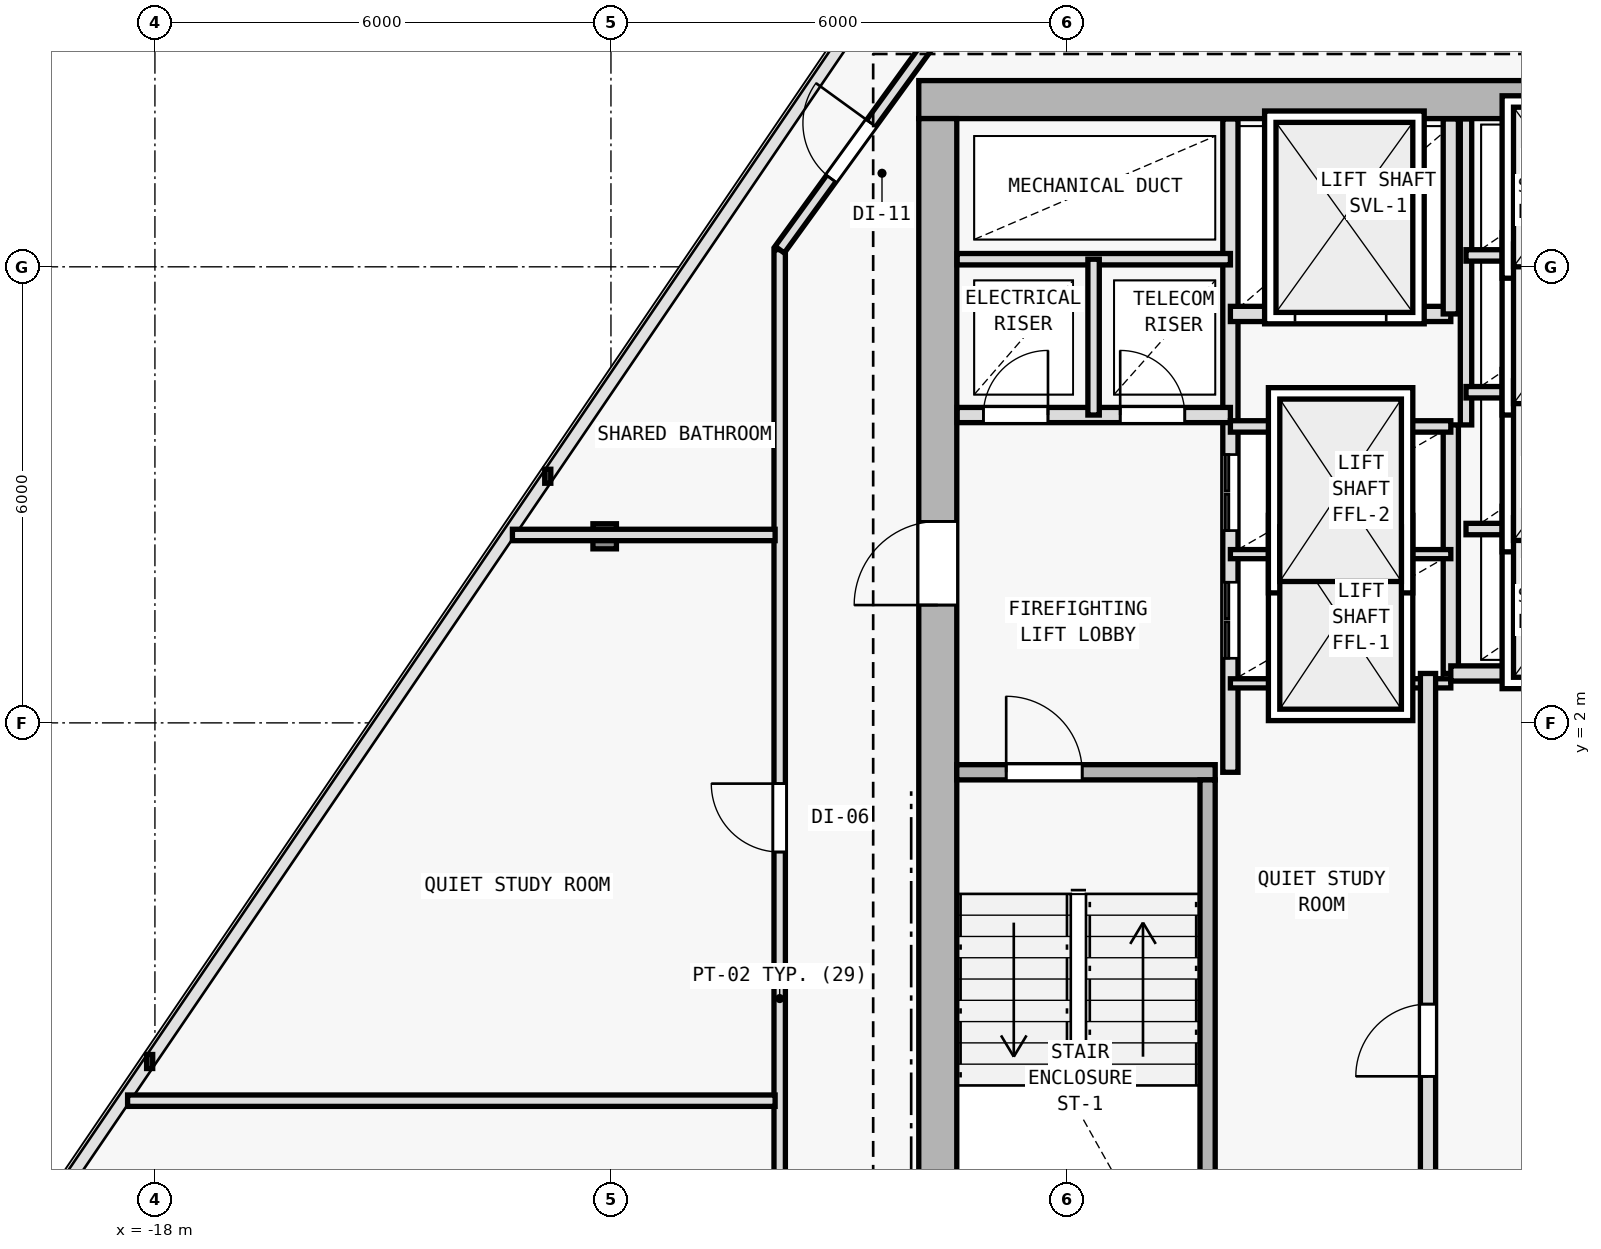
"""IFC4 building model, lengths in metres.
Left out: names, types, materials, properties, quantities, classifications, styles, units other than length and angle.
Written with IfcOpenShell. Run it as: python <this file> out.ifc"""

import sys

from ifc_helpers import new_model, si_unit, direction, frame, frame_2d, origin, origin_2d, place, context, subcontext, project, spatial, rectangle, i_section, extrude, element, fill, save


model = new_model("IFC4")
c1 = context("Model", 3, precision=1e-05, world=origin(), true_north=direction((0.0, 1.0)))
c2 = subcontext(c1, "Body", "Model", "MODEL_VIEW")
j1 = project(units=[si_unit("LENGTHUNIT", "METRE"), si_unit("PLANEANGLEUNIT", "RADIAN")], contexts=[c1])
p1 = place(None, origin())
s1 = spatial("IfcSite", under=j1, at=p1, CompositionType="ELEMENT")
p2 = place(p1, origin())
s2 = spatial("IfcBuilding", under=s1, at=p2, CompositionType="ELEMENT")
p3 = place(p2, frame((0.0, 0.0, 276.0)))
s3 = spatial("IfcBuildingStorey", under=s2, at=p3, CompositionType="ELEMENT", Elevation=276.0)
for number, where, z_axis, x_axis in (
    (1, (-7.7, 10.2, 0.0), (0.0, 0.0, 1.0), (1.0, 0.0, 0.0)),
    (2, (-7.7, 2.0, 0.0), (0.0, 0.0, 1.0), (1.0, 0.0, 0.0)),
):
    element("IfcColumn", number, at=place(p3, frame(where, z_axis=z_axis, x_axis=x_axis)), inside=s3, PredefinedType="COLUMN", context=c2, shape_type="SweptSolid", body=[
        extrude(i_section(OverallWidth=0.374, OverallDepth=0.372, WebThickness=0.012, FlangeThickness=0.02, FilletRadius=0.015, at=origin_2d()), origin(), (0.0, 0.0, 1.0), 3.6),
    ])
p4 = place(p3, frame((-12.083, 4.455, 0.006), z_axis=(0.017479483538, 0.009793951865, 0.999799252931), x_axis=(-0.488810085697, 0.87239022239, 0.0)))
e3 = element("IfcColumn", 3, at=p4, inside=s3, PredefinedType="COLUMN", context=c2, shape_type="SweptSolid", body=[
    extrude(i_section(OverallWidth=0.309, OverallDepth=0.33, WebThickness=0.011, FlangeThickness=0.019, FilletRadius=0.027, at=origin_2d()), origin(), (0.0, 0.0, 1.0), 3.59),
])
p5 = place(p3, frame((7.95, 10.2, 0.0), z_axis=(0.0, 0.0, 1.0), x_axis=(-1.0, 0.0, 0.0)))
e4 = element("IfcWall", 4, at=p5, inside=s3, PredefinedType="SHEAR", context=c2, shape_type="SweptSolid", body=[
    extrude(rectangle(XDim=15.9, YDim=0.5, at=frame_2d((7.95, 0.0))), origin(), (0.0, 0.0, 1.0), 3.35),
])
p6 = place(p5, frame((4.4, 0.0, 0.0)))
e5 = element("IfcOpeningElement", 5, at=p6, cuts=e4, PredefinedType="OPENING", context=c2, shape_type="SweptSolid", body=[
    extrude(rectangle(XDim=1.1, YDim=2.15, at=frame_2d((0.55, 1.075))), frame((0.0, 0.26, 0.0), z_axis=(0.0, -1.0, 0.0), x_axis=(1.0, 0.0, 0.0)), (0.0, 0.0, 1.0), 0.52),
])
p7 = place(p3, frame((-7.7, -9.15, 0.0), z_axis=(0.0, 0.0, 1.0), x_axis=(0.0, 1.0, 0.0)))
e6 = element("IfcWall", 6, at=p7, inside=s3, PredefinedType="SHEAR", context=c2, shape_type="SweptSolid", body=[
    extrude(rectangle(XDim=19.1, YDim=0.5, at=frame_2d((9.55, 0.0))), origin(), (0.0, 0.0, 1.0), 3.35),
])
p8 = place(p7, frame((12.7, 0.0, 0.0)))
e7 = element("IfcOpeningElement", 7, at=p8, cuts=e6, PredefinedType="OPENING", context=c2, shape_type="SweptSolid", body=[
    extrude(rectangle(XDim=1.1, YDim=2.15, at=frame_2d((0.55, 1.075))), frame((0.0, 0.26, 0.0), z_axis=(0.0, -1.0, 0.0), x_axis=(1.0, 0.0, 0.0)), (0.0, 0.0, 1.0), 0.52),
])
p9 = place(p3, frame((-7.45, 1.35, 0.0), z_axis=(0.0, 0.0, 1.0), x_axis=(1.0, 0.0, 0.0)))
e8 = element("IfcWall", 8, at=p9, inside=s3, PredefinedType="SOLIDWALL", context=c2, shape_type="SweptSolid", body=[
    extrude(rectangle(XDim=3.4, YDim=0.2, at=frame_2d((1.7, 0.0))), origin(), (0.0, 0.0, 1.0), 3.35),
])
p10 = place(p9, frame((0.65, 0.0, 0.0)))
e9 = element("IfcOpeningElement", 9, at=p10, cuts=e8, PredefinedType="OPENING", context=c2, shape_type="SweptSolid", body=[
    extrude(rectangle(XDim=1.0, YDim=2.15, at=frame_2d((0.5, 1.075))), frame((0.0, 0.11, 0.0), z_axis=(0.0, -1.0, 0.0), x_axis=(1.0, 0.0, 0.0)), (0.0, 0.0, 1.0), 0.22),
])
p11 = place(p3, frame((-4.15, -5.95, 0.0), z_axis=(0.0, 0.0, 1.0), x_axis=(0.0, 1.0, 0.0)))
e10 = element("IfcWall", 10, at=p11, inside=s3, PredefinedType="SOLIDWALL", context=c2, shape_type="SweptSolid", body=[
    extrude(rectangle(XDim=7.2, YDim=0.2, at=frame_2d((3.6, 0.0))), origin(), (0.0, 0.0, 1.0), 3.35),
])
p12 = place(p3, frame((-3.85, 1.35, 0.0), z_axis=(0.0, 0.0, 1.0), x_axis=(0.0, 1.0, 0.0)))
e11 = element("IfcWall", 11, at=p12, inside=s3, PredefinedType="SOLIDWALL", context=c2, shape_type="SweptSolid", body=[
    extrude(rectangle(XDim=8.595, YDim=0.2, at=frame_2d((4.297, 0.0))), origin(), (0.0, 0.0, 1.0), 3.35),
])
p13 = place(p12, frame((1.5, 0.0, 0.0)))
e12 = element("IfcOpeningElement", 12, at=p13, cuts=e11, PredefinedType="OPENING", context=c2, shape_type="SweptSolid", body=[
    extrude(rectangle(XDim=1.0, YDim=2.15, at=frame_2d((0.5, 1.075))), frame((0.0, 0.11, 0.0), z_axis=(0.0, -1.0, 0.0), x_axis=(1.0, 0.0, 0.0)), (0.0, 0.0, 1.0), 0.22),
])
p14 = place(p12, frame((3.18, 0.0, 0.0)))
e13 = element("IfcOpeningElement", 13, at=p14, cuts=e11, PredefinedType="OPENING", context=c2, shape_type="SweptSolid", body=[
    extrude(rectangle(XDim=1.0, YDim=2.15, at=frame_2d((0.5, 1.075))), frame((0.0, 0.11, 0.0), z_axis=(0.0, -1.0, 0.0), x_axis=(1.0, 0.0, 0.0)), (0.0, 0.0, 1.0), 0.22),
])
p15 = place(p3, frame((-7.445, 6.05, 0.0), z_axis=(0.0, 0.0, 1.0), x_axis=(1.0, 0.0, 0.0)))
e14 = element("IfcWall", 14, at=p15, inside=s3, PredefinedType="SOLIDWALL", context=c2, shape_type="SweptSolid", body=[
    extrude(rectangle(XDim=3.595, YDim=0.2, at=frame_2d((1.797, 0.0))), origin(), (0.0, 0.0, 1.0), 3.35),
])
p16 = place(p15, frame((0.345, 0.0, 0.0)))
e15 = element("IfcOpeningElement", 15, at=p16, cuts=e14, PredefinedType="OPENING", context=c2, shape_type="SweptSolid", body=[
    extrude(rectangle(XDim=0.85, YDim=2.1, at=frame_2d((0.425, 1.05))), frame((0.0, 0.11, 0.0), z_axis=(0.0, -1.0, 0.0), x_axis=(1.0, 0.0, 0.0)), (0.0, 0.0, 1.0), 0.22),
])
p17 = place(p15, frame((2.145, 0.0, 0.0)))
e16 = element("IfcOpeningElement", 16, at=p17, cuts=e14, PredefinedType="OPENING", context=c2, shape_type="SweptSolid", body=[
    extrude(rectangle(XDim=0.85, YDim=2.1, at=frame_2d((0.425, 1.05))), frame((0.0, 0.11, 0.0), z_axis=(0.0, -1.0, 0.0), x_axis=(1.0, 0.0, 0.0)), (0.0, 0.0, 1.0), 0.22),
])
p18 = place(p3, frame((-7.445, 8.1, 0.0), z_axis=(0.0, 0.0, 1.0), x_axis=(1.0, 0.0, 0.0)))
e17 = element("IfcWall", 17, at=p18, inside=s3, PredefinedType="PARTITIONING", context=c2, shape_type="SweptSolid", body=[
    extrude(rectangle(XDim=3.595, YDim=0.15, at=frame_2d((1.797, 0.0))), origin(), (0.0, 0.0, 1.0), 3.35),
])
p19 = place(p3, frame((-5.65, 6.05, 0.0), z_axis=(0.0, 0.0, 1.0), x_axis=(0.0, 1.0, 0.0)))
e18 = element("IfcWall", 18, at=p19, inside=s3, PredefinedType="PARTITIONING", context=c2, shape_type="SweptSolid", body=[
    extrude(rectangle(XDim=2.05, YDim=0.15, at=frame_2d((1.025, 0.0))), origin(), (0.0, 0.0, 1.0), 3.35),
])
p20 = place(p3, frame((-0.95, 2.65, 0.0), z_axis=(0.0, 0.0, 1.0), x_axis=(0.0, 1.0, 0.0)))
e19 = element("IfcWall", 19, at=p20, inside=s3, PredefinedType="SOLIDWALL", context=c2, shape_type="SweptSolid", body=[
    extrude(rectangle(XDim=3.27, YDim=0.2, at=frame_2d((1.635, 0.0))), origin(), (0.0, 0.0, 1.0), 3.35),
])
for number, where, z_axis, x_axis in (
    (20, (-3.85, 2.52, 0.0), (0.0, 0.0, 1.0), (1.0, 0.0, 0.0)),
    (21, (-3.85, 4.22, 0.0), (0.0, 0.0, 1.0), (1.0, 0.0, 0.0)),
):
    element("IfcWall", number, at=place(p3, frame(where, z_axis=z_axis, x_axis=x_axis)), inside=s3, PredefinedType="PARTITIONING", context=c2, shape_type="SweptSolid", body=[
        extrude(rectangle(XDim=2.9, YDim=0.12, at=frame_2d((1.45, 0.0))), origin(), (0.0, 0.0, 1.0), 3.35),
    ])
p21 = place(p3, frame((-3.85, 5.9, 0.0), z_axis=(0.0, 0.0, 1.0), x_axis=(1.0, 0.0, 0.0)))
e22 = element("IfcWall", 22, at=p21, inside=s3, PredefinedType="PARTITIONING", context=c2, shape_type="SweptSolid", body=[
    extrude(rectangle(XDim=2.9, YDim=0.15, at=frame_2d((1.45, 0.0))), origin(), (0.0, 0.0, 1.0), 3.35),
])
p22 = place(p3, frame((-3.85, 7.38, 0.0), z_axis=(0.0, 0.0, 1.0), x_axis=(1.0, 0.0, 0.0)))
e23 = element("IfcWall", 23, at=p22, inside=s3, PredefinedType="SOLIDWALL", context=c2, shape_type="SweptSolid", body=[
    extrude(rectangle(XDim=2.9, YDim=0.2, at=frame_2d((1.45, 0.0))), origin(), (0.0, 0.0, 1.0), 3.35),
])
p23 = place(p22, frame((0.85, 0.0, 0.0)))
e24 = element("IfcOpeningElement", 24, at=p23, cuts=e23, PredefinedType="OPENING", context=c2, shape_type="SweptSolid", body=[
    extrude(rectangle(XDim=1.2, YDim=2.2, at=frame_2d((0.6, 1.1))), frame((0.0, 0.11, 0.0), z_axis=(0.0, -1.0, 0.0), x_axis=(1.0, 0.0, 0.0)), (0.0, 0.0, 1.0), 0.22),
])
p24 = place(p3, frame((-0.95, 7.38, 0.0), z_axis=(0.0, 0.0, 1.0), x_axis=(0.0, 1.0, 0.0)))
e25 = element("IfcWall", 25, at=p24, inside=s3, PredefinedType="SOLIDWALL", context=c2, shape_type="SweptSolid", body=[
    extrude(rectangle(XDim=2.565, YDim=0.2, at=frame_2d((1.283, 0.0))), origin(), (0.0, 0.0, 1.0), 3.35),
])
p25 = place(p3, frame((-1.25, -6.05, 0.0), z_axis=(0.0, 0.0, 1.0), x_axis=(0.0, 1.0, 0.0)))
e26 = element("IfcWall", 26, at=p25, inside=s3, PredefinedType="SOLIDWALL", context=c2, shape_type="SweptSolid", body=[
    extrude(rectangle(XDim=8.7, YDim=0.2, at=frame_2d((4.35, 0.0))), origin(), (0.0, 0.0, 1.0), 3.35),
])
p26 = place(p25, frame((3.4, 0.0, 0.0)))
e27 = element("IfcOpeningElement", 27, at=p26, cuts=e26, PredefinedType="OPENING", context=c2, shape_type="SweptSolid", body=[
    extrude(rectangle(XDim=0.95, YDim=2.1, at=frame_2d((0.475, 1.05))), frame((0.0, 0.11, 0.0), z_axis=(0.0, -1.0, 0.0), x_axis=(1.0, 0.0, 0.0)), (0.0, 0.0, 1.0), 0.22),
])
p27 = place(p3, frame((-0.95, 2.65, 0.0), z_axis=(0.0, 0.0, 1.0), x_axis=(1.0, 0.0, 0.0)))
e28 = element("IfcWall", 28, at=p27, inside=s3, PredefinedType="SOLIDWALL", context=c2, shape_type="SweptSolid", body=[
    extrude(rectangle(XDim=2.9, YDim=0.2, at=frame_2d((1.45, 0.0))), origin(), (0.0, 0.0, 1.0), 3.35),
])
p28 = place(p3, frame((-0.75, 5.92, 0.0), z_axis=(0.0, 0.0, 1.0), x_axis=(0.0, 1.0, 0.0)))
e29 = element("IfcWall", 29, at=p28, inside=s3, PredefinedType="PARTITIONING", context=c2, shape_type="SweptSolid", body=[
    extrude(rectangle(XDim=4.025, YDim=0.15, at=frame_2d((2.013, 0.0))), origin(), (0.0, 0.0, 1.0), 3.35),
])
for number, where, z_axis, x_axis in (
    (30, (-0.75, 4.55, 0.0), (0.0, 0.0, 1.0), (1.0, 0.0, 0.0)),
    (31, (-0.75, 6.35, 0.0), (0.0, 0.0, 1.0), (1.0, 0.0, 0.0)),
    (32, (-0.75, 8.15, 0.0), (0.0, 0.0, 1.0), (1.0, 0.0, 0.0)),
):
    element("IfcWall", number, at=place(p3, frame(where, z_axis=z_axis, x_axis=x_axis)), inside=s3, PredefinedType="PARTITIONING", context=c2, shape_type="SweptSolid", body=[
        extrude(rectangle(XDim=2.7, YDim=0.15, at=frame_2d((1.35, 0.0))), origin(), (0.0, 0.0, 1.0), 3.35),
    ])
p29 = place(p3, frame((-9.78, -11.48, 0.0), z_axis=(0.0, 0.0, 1.0), x_axis=(0.0, 1.0, 0.0)))
e33 = element("IfcWall", 33, at=p29, inside=s3, PredefinedType="PARTITIONING", context=c2, shape_type="SweptSolid", body=[
    extrude(rectangle(XDim=19.706, YDim=0.15, at=frame_2d((9.853, 0.0))), origin(), (0.0, 0.0, 1.0), 2.775),
])
p30 = place(p29, frame((11.781, 0.0, 0.0)))
e34 = element("IfcOpeningElement", 34, at=p30, cuts=e33, PredefinedType="OPENING", context=c2, shape_type="SweptSolid", body=[
    extrude(rectangle(XDim=0.9, YDim=2.1, at=frame_2d((0.45, 1.05))), frame((0.0, 0.085, 0.0), z_axis=(0.0, -1.0, 0.0), x_axis=(1.0, 0.0, 0.0)), (0.0, 0.0, 1.0), 0.17),
])
p31 = place(p29, frame((3.894, 0.0, 0.0)))
e35 = element("IfcOpeningElement", 35, at=p31, cuts=e33, PredefinedType="OPENING", context=c2, shape_type="SweptSolid", body=[
    extrude(rectangle(XDim=0.9, YDim=2.1, at=frame_2d((0.45, 1.05))), frame((0.0, 0.085, 0.0), z_axis=(0.0, -1.0, 0.0), x_axis=(1.0, 0.0, 0.0)), (0.0, 0.0, 1.0), 0.17),
])
p32 = place(p3, frame((-9.78, 8.226, 0.0), z_axis=(0.0, 0.0, 1.0), x_axis=(0.586956386413, 0.809618552436, 0.0)))
e36 = element("IfcWall", 36, at=p32, inside=s3, PredefinedType="PARTITIONING", context=c2, shape_type="SweptSolid", body=[
    extrude(rectangle(XDim=5.008, YDim=0.15, at=frame_2d((2.504, 0.0))), origin(), (0.0, 0.0, 1.0), 3.015),
])
p33 = place(p32, frame((1.154, 0.0, 0.0)))
e37 = element("IfcOpeningElement", 37, at=p33, cuts=e36, PredefinedType="OPENING", context=c2, shape_type="SweptSolid", body=[
    extrude(rectangle(XDim=0.9, YDim=2.1, at=frame_2d((0.45, 1.05))), frame((0.0, 0.085, 0.0), z_axis=(0.0, -1.0, 0.0), x_axis=(1.0, 0.0, 0.0)), (0.0, 0.0, 1.0), 0.17),
])
p34 = place(p3, frame((-9.84, 4.472, 0.0), z_axis=(0.0, 0.0, 1.0), x_axis=(-1.0, 0.0, 0.0)))
e38 = element("IfcWall", 38, at=p34, inside=s3, PredefinedType="PARTITIONING", context=c2, shape_type="SweptSolid", body=[
    extrude(rectangle(XDim=3.456, YDim=0.15, at=frame_2d((1.728, 0.0))), origin(), (0.0, 0.0, 1.0), 3.015),
])
p35 = place(p3, frame((-9.84, -2.971, 0.0), z_axis=(0.0, 0.0, 1.0), x_axis=(-1.0, 0.0, 0.0)))
e39 = element("IfcWall", 39, at=p35, inside=s3, PredefinedType="PARTITIONING", context=c2, shape_type="SweptSolid", body=[
    extrude(rectangle(XDim=8.52, YDim=0.15, at=frame_2d((4.26, 0.0))), origin(), (0.0, 0.0, 1.0), 2.825),
])
p36 = place(p8, origin())
e40 = element("IfcDoor", 40, at=p36, inside=s3, OperationType="SINGLE_SWING_LEFT", PredefinedType="DOOR", context=c2, shape_type="SweptSolid", body=[
    extrude(rectangle(XDim=1.1, YDim=2.15, at=frame_2d((0.55, 1.075))), frame((0.0, 0.025, 0.0), z_axis=(0.0, -1.0, 0.0), x_axis=(1.0, 0.0, 0.0)), (0.0, 0.0, 1.0), 0.05),
])
fill(e7, e40)
p37 = place(p10, origin())
e41 = element("IfcDoor", 41, at=p37, inside=s3, OperationType="SINGLE_SWING_LEFT", PredefinedType="DOOR", context=c2, shape_type="SweptSolid", body=[
    extrude(rectangle(XDim=1.0, YDim=2.15, at=frame_2d((0.5, 1.075))), frame((0.0, 0.025, 0.0), z_axis=(0.0, -1.0, 0.0), x_axis=(1.0, 0.0, 0.0)), (0.0, 0.0, 1.0), 0.05),
])
fill(e9, e41)
p38 = place(p16, origin())
e42 = element("IfcDoor", 42, at=p38, inside=s3, OperationType="SINGLE_SWING_RIGHT", PredefinedType="DOOR", context=c2, shape_type="SweptSolid", body=[
    extrude(rectangle(XDim=0.85, YDim=2.1, at=frame_2d((0.425, 1.05))), frame((0.0, 0.025, 0.0), z_axis=(0.0, -1.0, 0.0), x_axis=(1.0, 0.0, 0.0)), (0.0, 0.0, 1.0), 0.05),
])
fill(e15, e42)
p39 = place(p17, origin())
e43 = element("IfcDoor", 43, at=p39, inside=s3, OperationType="SINGLE_SWING_LEFT", PredefinedType="DOOR", context=c2, shape_type="SweptSolid", body=[
    extrude(rectangle(XDim=0.85, YDim=2.1, at=frame_2d((0.425, 1.05))), frame((0.0, 0.025, 0.0), z_axis=(0.0, -1.0, 0.0), x_axis=(1.0, 0.0, 0.0)), (0.0, 0.0, 1.0), 0.05),
])
fill(e16, e43)
p40 = place(p23, origin())
e44 = element("IfcDoor", 44, at=p40, inside=s3, OperationType="DOUBLE_DOOR_SLIDING", PredefinedType="DOOR", context=c2, shape_type="SweptSolid", body=[
    extrude(rectangle(XDim=1.2, YDim=2.2, at=frame_2d((0.6, 1.1))), frame((0.0, 0.025, 0.0), z_axis=(0.0, -1.0, 0.0), x_axis=(1.0, 0.0, 0.0)), (0.0, 0.0, 1.0), 0.05),
])
fill(e24, e44)
p41 = place(p26, origin())
e45 = element("IfcDoor", 45, at=p41, inside=s3, OperationType="SINGLE_SWING_LEFT", PredefinedType="DOOR", context=c2, shape_type="SweptSolid", body=[
    extrude(rectangle(XDim=0.95, YDim=2.1, at=frame_2d((0.475, 1.05))), frame((0.0, 0.025, 0.0), z_axis=(0.0, -1.0, 0.0), x_axis=(1.0, 0.0, 0.0)), (0.0, 0.0, 1.0), 0.05),
])
fill(e27, e45)
p42 = place(p13, origin())
e46 = element("IfcDoor", 46, at=p42, inside=s3, OperationType="DOUBLE_DOOR_SLIDING", PredefinedType="DOOR", context=c2, shape_type="SweptSolid", body=[
    extrude(rectangle(XDim=1.0, YDim=2.15, at=frame_2d((0.5, 1.075))), frame((0.0, 0.025, 0.0), z_axis=(0.0, -1.0, 0.0), x_axis=(1.0, 0.0, 0.0)), (0.0, 0.0, 1.0), 0.05),
])
fill(e12, e46)
p43 = place(p14, origin())
e47 = element("IfcDoor", 47, at=p43, inside=s3, OperationType="DOUBLE_DOOR_SLIDING", PredefinedType="DOOR", context=c2, shape_type="SweptSolid", body=[
    extrude(rectangle(XDim=1.0, YDim=2.15, at=frame_2d((0.5, 1.075))), frame((0.0, 0.025, 0.0), z_axis=(0.0, -1.0, 0.0), x_axis=(1.0, 0.0, 0.0)), (0.0, 0.0, 1.0), 0.05),
])
fill(e13, e47)
p44 = place(p30, origin())
e48 = element("IfcDoor", 48, at=p44, inside=s3, OperationType="SINGLE_SWING_RIGHT", PredefinedType="DOOR", context=c2, shape_type="SweptSolid", body=[
    extrude(rectangle(XDim=0.9, YDim=2.1, at=frame_2d((0.45, 1.05))), frame((0.0, 0.025, 0.0), z_axis=(0.0, -1.0, 0.0), x_axis=(1.0, 0.0, 0.0)), (0.0, 0.0, 1.0), 0.05),
])
fill(e34, e48)
p45 = place(p33, origin())
e49 = element("IfcDoor", 49, at=p45, inside=s3, OperationType="SINGLE_SWING_RIGHT", PredefinedType="DOOR", context=c2, shape_type="SweptSolid", body=[
    extrude(rectangle(XDim=0.9, YDim=2.1, at=frame_2d((0.45, 1.05))), frame((0.0, 0.025, 0.0), z_axis=(0.0, -1.0, 0.0), x_axis=(1.0, 0.0, 0.0)), (0.0, 0.0, 1.0), 0.05),
])
fill(e37, e49)
save(model, sys.argv[1])
